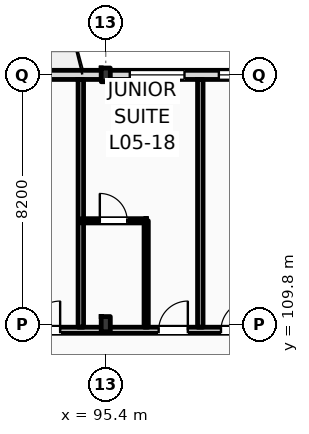
"""IFC4 building model, lengths in metres.
Left out: names, types, materials, properties, quantities, classifications, styles, units other than length and angle.
Written with IfcOpenShell. Run it as: python <this file> out.ifc"""

import sys

from ifc_helpers import new_model, si_unit, direction, frame, frame_2d, origin, origin_2d, place, context, subcontext, project, spatial, rectangle, i_section, extrude, element, fill, save


model = new_model("IFC4")
c1 = context("Model", 3, precision=1e-05, world=origin(), true_north=direction((0.0, 1.0)))
c2 = subcontext(c1, "Body", "Model", "MODEL_VIEW")
j1 = project(units=[si_unit("LENGTHUNIT", "METRE"), si_unit("PLANEANGLEUNIT", "RADIAN")], contexts=[c1])
p1 = place(None, origin())
s1 = spatial("IfcSite", under=j1, at=p1, CompositionType="ELEMENT")
p2 = place(p1, origin())
s2 = spatial("IfcBuilding", under=s1, at=p2, CompositionType="ELEMENT")
p3 = place(p2, frame((0.0, 0.0, 24.6)))
s3 = spatial("IfcBuildingStorey", under=s2, at=p3, CompositionType="ELEMENT", Elevation=24.6)
p4 = place(p3, frame((95.4, 109.8, 0.0), z_axis=(0.0, 0.0, 1.0), x_axis=(1.0, 0.0, 0.0)))
e1 = element("IfcColumn", 1, at=p4, inside=s3, PredefinedType="COLUMN", context=c2, shape_type="SweptSolid", body=[
    extrude(i_section(OverallWidth=0.3, OverallDepth=0.5, WebThickness=0.014, FlangeThickness=0.028, FilletRadius=0.027, at=origin_2d()), origin(), (0.0, 0.0, 1.0), 3.6),
])
p5 = place(p3, frame((95.4, 118.0, 0.0), z_axis=(0.0, 0.0, 1.0), x_axis=(1.0, 0.0, 0.0)))
e2 = element("IfcColumn", 2, at=p5, inside=s3, PredefinedType="COLUMN", context=c2, shape_type="SweptSolid", body=[
    extrude(i_section(OverallWidth=0.3, OverallDepth=0.45, WebThickness=0.014, FlangeThickness=0.026, FilletRadius=0.027, at=origin_2d()), origin(), (0.0, 0.0, 1.0), 3.6),
])
p6 = place(p3, frame((22.5, 118.0, 0.0), z_axis=(0.0, 0.0, 1.0), x_axis=(1.0, 0.0, 0.0)))
e3 = element("IfcWall", 3, at=p6, inside=s3, PredefinedType="STANDARD", context=c2, shape_type="SweptSolid", body=[
    extrude(rectangle(XDim=97.5, YDim=0.3, at=frame_2d((48.75, 0.0))), origin(), (0.0, 0.0, 1.0), 2.78),
])
p7 = place(p6, frame((0.91, 0.0, 0.9)))
e4 = element("IfcOpeningElement", 4, at=p7, cuts=e3, PredefinedType="OPENING", context=c2, shape_type="SweptSolid", body=[
    extrude(rectangle(XDim=0.9, YDim=1.7, at=frame_2d((0.45, 0.85))), frame((0.0, 0.16, 0.0), z_axis=(0.0, -1.0, 0.0), x_axis=(1.0, 0.0, 0.0)), (0.0, 0.0, 1.0), 0.32),
])
p8 = place(p6, frame((6.275, 0.0, 0.0)))
e5 = element("IfcOpeningElement", 5, at=p8, cuts=e3, PredefinedType="OPENING", context=c2, shape_type="SweptSolid", body=[
    extrude(rectangle(XDim=1.2, YDim=2.25, at=frame_2d((0.6, 1.125))), frame((0.0, 0.16, 0.0), z_axis=(0.0, -1.0, 0.0), x_axis=(1.0, 0.0, 0.0)), (0.0, 0.0, 1.0), 0.32),
])
p9 = place(p6, frame((11.42, 0.0, 0.9)))
e6 = element("IfcOpeningElement", 6, at=p9, cuts=e3, PredefinedType="OPENING", context=c2, shape_type="SweptSolid", body=[
    extrude(rectangle(XDim=1.35, YDim=1.7, at=frame_2d((0.675, 0.85))), frame((0.0, 0.16, 0.0), z_axis=(0.0, -1.0, 0.0), x_axis=(1.0, 0.0, 0.0)), (0.0, 0.0, 1.0), 0.32),
])
p10 = place(p6, frame((14.345, 0.0, 0.9)))
e7 = element("IfcOpeningElement", 7, at=p10, cuts=e3, PredefinedType="OPENING", context=c2, shape_type="SweptSolid", body=[
    extrude(rectangle(XDim=1.8, YDim=1.7, at=frame_2d((0.9, 0.85))), frame((0.0, 0.16, 0.0), z_axis=(0.0, -1.0, 0.0), x_axis=(1.0, 0.0, 0.0)), (0.0, 0.0, 1.0), 0.32),
])
p11 = place(p6, frame((19.27, 0.0, 0.9)))
e8 = element("IfcOpeningElement", 8, at=p11, cuts=e3, PredefinedType="OPENING", context=c2, shape_type="SweptSolid", body=[
    extrude(rectangle(XDim=1.95, YDim=1.7, at=frame_2d((0.975, 0.85))), frame((0.0, 0.16, 0.0), z_axis=(0.0, -1.0, 0.0), x_axis=(1.0, 0.0, 0.0)), (0.0, 0.0, 1.0), 0.32),
])
p12 = place(p6, frame((22.97, 0.0, 0.0)))
e9 = element("IfcOpeningElement", 9, at=p12, cuts=e3, PredefinedType="OPENING", context=c2, shape_type="SweptSolid", body=[
    extrude(rectangle(XDim=1.2, YDim=2.25, at=frame_2d((0.6, 1.125))), frame((0.0, 0.16, 0.0), z_axis=(0.0, -1.0, 0.0), x_axis=(1.0, 0.0, 0.0)), (0.0, 0.0, 1.0), 0.32),
])
p13 = place(p6, frame((26.92, 0.0, 0.9)))
e10 = element("IfcOpeningElement", 10, at=p13, cuts=e3, PredefinedType="OPENING", context=c2, shape_type="SweptSolid", body=[
    extrude(rectangle(XDim=2.25, YDim=1.7, at=frame_2d((1.125, 0.85))), frame((0.0, 0.16, 0.0), z_axis=(0.0, -1.0, 0.0), x_axis=(1.0, 0.0, 0.0)), (0.0, 0.0, 1.0), 0.32),
])
p14 = place(p6, frame((30.645, 0.0, 0.9)))
e11 = element("IfcOpeningElement", 11, at=p14, cuts=e3, PredefinedType="OPENING", context=c2, shape_type="SweptSolid", body=[
    extrude(rectangle(XDim=2.4, YDim=1.7, at=frame_2d((1.2, 0.85))), frame((0.0, 0.16, 0.0), z_axis=(0.0, -1.0, 0.0), x_axis=(1.0, 0.0, 0.0)), (0.0, 0.0, 1.0), 0.32),
])
p15 = place(p6, frame((36.71, 0.0, 0.0)))
e12 = element("IfcOpeningElement", 12, at=p15, cuts=e3, PredefinedType="OPENING", context=c2, shape_type="SweptSolid", body=[
    extrude(rectangle(XDim=1.2, YDim=2.25, at=frame_2d((0.6, 1.125))), frame((0.0, 0.16, 0.0), z_axis=(0.0, -1.0, 0.0), x_axis=(1.0, 0.0, 0.0)), (0.0, 0.0, 1.0), 0.32),
])
p16 = place(p6, frame((39.17, 0.0, 0.0)))
e13 = element("IfcOpeningElement", 13, at=p16, cuts=e3, PredefinedType="OPENING", context=c2, shape_type="SweptSolid", body=[
    extrude(rectangle(XDim=1.2, YDim=2.25, at=frame_2d((0.6, 1.125))), frame((0.0, 0.16, 0.0), z_axis=(0.0, -1.0, 0.0), x_axis=(1.0, 0.0, 0.0)), (0.0, 0.0, 1.0), 0.32),
])
p17 = place(p6, frame((43.22, 0.0, 0.9)))
e14 = element("IfcOpeningElement", 14, at=p17, cuts=e3, PredefinedType="OPENING", context=c2, shape_type="SweptSolid", body=[
    extrude(rectangle(XDim=2.85, YDim=1.7, at=frame_2d((1.425, 0.85))), frame((0.0, 0.16, 0.0), z_axis=(0.0, -1.0, 0.0), x_axis=(1.0, 0.0, 0.0)), (0.0, 0.0, 1.0), 0.32),
])
p18 = place(p6, frame((47.29, 0.0, 0.9)))
e15 = element("IfcOpeningElement", 15, at=p18, cuts=e3, PredefinedType="OPENING", context=c2, shape_type="SweptSolid", body=[
    extrude(rectangle(XDim=1.35, YDim=1.7, at=frame_2d((0.675, 0.85))), frame((0.0, 0.16, 0.0), z_axis=(0.0, -1.0, 0.0), x_axis=(1.0, 0.0, 0.0)), (0.0, 0.0, 1.0), 0.32),
])
p19 = place(p6, frame((52.91, 0.0, 0.0)))
e16 = element("IfcOpeningElement", 16, at=p19, cuts=e3, PredefinedType="OPENING", context=c2, shape_type="SweptSolid", body=[
    extrude(rectangle(XDim=1.2, YDim=2.25, at=frame_2d((0.6, 1.125))), frame((0.0, 0.16, 0.0), z_axis=(0.0, -1.0, 0.0), x_axis=(1.0, 0.0, 0.0)), (0.0, 0.0, 1.0), 0.32),
])
p20 = place(p6, frame((55.69, 0.0, 0.9)))
e17 = element("IfcOpeningElement", 17, at=p20, cuts=e3, PredefinedType="OPENING", context=c2, shape_type="SweptSolid", body=[
    extrude(rectangle(XDim=0.9, YDim=1.7, at=frame_2d((0.45, 0.85))), frame((0.0, 0.16, 0.0), z_axis=(0.0, -1.0, 0.0), x_axis=(1.0, 0.0, 0.0)), (0.0, 0.0, 1.0), 0.32),
])
p21 = place(p6, frame((59.82, 0.0, 0.9)))
e18 = element("IfcOpeningElement", 18, at=p21, cuts=e3, PredefinedType="OPENING", context=c2, shape_type="SweptSolid", body=[
    extrude(rectangle(XDim=3.25, YDim=1.7, at=frame_2d((1.625, 0.85))), frame((0.0, 0.16, 0.0), z_axis=(0.0, -1.0, 0.0), x_axis=(1.0, 0.0, 0.0)), (0.0, 0.0, 1.0), 0.32),
])
p22 = place(p6, frame((65.89, 0.0, 0.9)))
e19 = element("IfcOpeningElement", 19, at=p22, cuts=e3, PredefinedType="OPENING", context=c2, shape_type="SweptSolid", body=[
    extrude(rectangle(XDim=1.1, YDim=1.7, at=frame_2d((0.55, 0.85))), frame((0.0, 0.16, 0.0), z_axis=(0.0, -1.0, 0.0), x_axis=(1.0, 0.0, 0.0)), (0.0, 0.0, 1.0), 0.32),
])
p23 = place(p6, frame((69.245, 0.0, 0.0)))
e20 = element("IfcOpeningElement", 20, at=p23, cuts=e3, PredefinedType="OPENING", context=c2, shape_type="SweptSolid", body=[
    extrude(rectangle(XDim=1.2, YDim=2.25, at=frame_2d((0.6, 1.125))), frame((0.0, 0.16, 0.0), z_axis=(0.0, -1.0, 0.0), x_axis=(1.0, 0.0, 0.0)), (0.0, 0.0, 1.0), 0.32),
])
p24 = place(p6, frame((73.69, 0.0, 0.9)))
e21 = element("IfcOpeningElement", 21, at=p24, cuts=e3, PredefinedType="OPENING", context=c2, shape_type="SweptSolid", body=[
    extrude(rectangle(XDim=1.8, YDim=1.7, at=frame_2d((0.9, 0.85))), frame((0.0, 0.16, 0.0), z_axis=(0.0, -1.0, 0.0), x_axis=(1.0, 0.0, 0.0)), (0.0, 0.0, 1.0), 0.32),
])
p25 = place(p6, frame((76.62, 0.0, 0.9)))
e22 = element("IfcOpeningElement", 22, at=p25, cuts=e3, PredefinedType="OPENING", context=c2, shape_type="SweptSolid", body=[
    extrude(rectangle(XDim=3.25, YDim=1.7, at=frame_2d((1.625, 0.85))), frame((0.0, 0.16, 0.0), z_axis=(0.0, -1.0, 0.0), x_axis=(1.0, 0.0, 0.0)), (0.0, 0.0, 1.0), 0.32),
])
p26 = place(p6, frame((81.895, 0.0, 0.9)))
e23 = element("IfcOpeningElement", 23, at=p26, cuts=e3, PredefinedType="OPENING", context=c2, shape_type="SweptSolid", body=[
    extrude(rectangle(XDim=1.1, YDim=1.5, at=frame_2d((0.55, 0.75))), frame((0.0, 0.16, 0.0), z_axis=(0.0, -1.0, 0.0), x_axis=(1.0, 0.0, 0.0)), (0.0, 0.0, 1.0), 0.32),
])
p27 = place(p6, frame((86.02, 0.0, 0.9)))
e24 = element("IfcOpeningElement", 24, at=p27, cuts=e3, PredefinedType="OPENING", context=c2, shape_type="SweptSolid", body=[
    extrude(rectangle(XDim=1.25, YDim=1.6, at=frame_2d((0.625, 0.8))), frame((0.0, 0.16, 0.0), z_axis=(0.0, -1.0, 0.0), x_axis=(1.0, 0.0, 0.0)), (0.0, 0.0, 1.0), 0.32),
])
p28 = place(p6, frame((90.145, 0.0, 0.9)))
e25 = element("IfcOpeningElement", 25, at=p28, cuts=e3, PredefinedType="OPENING", context=c2, shape_type="SweptSolid", body=[
    extrude(rectangle(XDim=1.4, YDim=1.7, at=frame_2d((0.7, 0.85))), frame((0.0, 0.16, 0.0), z_axis=(0.0, -1.0, 0.0), x_axis=(1.0, 0.0, 0.0)), (0.0, 0.0, 1.0), 0.32),
])
p29 = place(p6, frame((94.155, 0.0, 0.9)))
e26 = element("IfcOpeningElement", 26, at=p29, cuts=e3, PredefinedType="OPENING", context=c2, shape_type="SweptSolid", body=[
    extrude(rectangle(XDim=1.6, YDim=1.7, at=frame_2d((0.8, 0.85))), frame((0.0, 0.16, 0.0), z_axis=(0.0, -1.0, 0.0), x_axis=(1.0, 0.0, 0.0)), (0.0, 0.0, 1.0), 0.32),
])
p30 = place(p3, frame((10.65, 109.6, 0.0), z_axis=(0.0, 0.0, 1.0), x_axis=(1.0, 0.0, 0.0)))
e27 = element("IfcWall", 27, at=p30, inside=s3, PredefinedType="PARTITIONING", context=c2, shape_type="SweptSolid", body=[
    extrude(rectangle(XDim=109.21, YDim=0.2, at=frame_2d((54.605, 0.0))), origin(), (0.0, 0.0, 1.0), 2.78),
])
p31 = place(p30, frame((12.705, 0.0, 0.0)))
e28 = element("IfcOpeningElement", 28, at=p31, cuts=e27, PredefinedType="OPENING", context=c2, shape_type="SweptSolid", body=[
    extrude(rectangle(XDim=1.02, YDim=2.2, at=frame_2d((0.51, 1.1))), frame((0.0, 0.11, 0.0), z_axis=(0.0, -1.0, 0.0), x_axis=(1.0, 0.0, 0.0)), (0.0, 0.0, 1.0), 0.22),
])
p32 = place(p30, frame((19.26, 0.0, 0.0)))
e29 = element("IfcOpeningElement", 29, at=p32, cuts=e27, PredefinedType="OPENING", context=c2, shape_type="SweptSolid", body=[
    extrude(rectangle(XDim=1.02, YDim=2.2, at=frame_2d((0.51, 1.1))), frame((0.0, 0.11, 0.0), z_axis=(0.0, -1.0, 0.0), x_axis=(1.0, 0.0, 0.0)), (0.0, 0.0, 1.0), 0.22),
])
p33 = place(p30, frame((23.71, 0.0, 0.0)))
e30 = element("IfcOpeningElement", 30, at=p33, cuts=e27, PredefinedType="OPENING", context=c2, shape_type="SweptSolid", body=[
    extrude(rectangle(XDim=1.02, YDim=2.2, at=frame_2d((0.51, 1.1))), frame((0.0, 0.11, 0.0), z_axis=(0.0, -1.0, 0.0), x_axis=(1.0, 0.0, 0.0)), (0.0, 0.0, 1.0), 0.22),
])
p34 = place(p30, frame((27.66, 0.0, 0.0)))
e31 = element("IfcOpeningElement", 31, at=p34, cuts=e27, PredefinedType="OPENING", context=c2, shape_type="SweptSolid", body=[
    extrude(rectangle(XDim=1.02, YDim=2.2, at=frame_2d((0.51, 1.1))), frame((0.0, 0.11, 0.0), z_axis=(0.0, -1.0, 0.0), x_axis=(1.0, 0.0, 0.0)), (0.0, 0.0, 1.0), 0.22),
])
p35 = place(p30, frame((31.89, 0.0, 0.0)))
e32 = element("IfcOpeningElement", 32, at=p35, cuts=e27, PredefinedType="OPENING", context=c2, shape_type="SweptSolid", body=[
    extrude(rectangle(XDim=0.96, YDim=2.2, at=frame_2d((0.48, 1.1))), frame((0.0, 0.11, 0.0), z_axis=(0.0, -1.0, 0.0), x_axis=(1.0, 0.0, 0.0)), (0.0, 0.0, 1.0), 0.22),
])
p36 = place(p30, frame((33.94, 0.0, 0.0)))
e33 = element("IfcOpeningElement", 33, at=p36, cuts=e27, PredefinedType="OPENING", context=c2, shape_type="SweptSolid", body=[
    extrude(rectangle(XDim=0.96, YDim=2.2, at=frame_2d((0.48, 1.1))), frame((0.0, 0.11, 0.0), z_axis=(0.0, -1.0, 0.0), x_axis=(1.0, 0.0, 0.0)), (0.0, 0.0, 1.0), 0.22),
])
p37 = place(p30, frame((40.29, 0.0, 0.0)))
e34 = element("IfcOpeningElement", 34, at=p37, cuts=e27, PredefinedType="OPENING", context=c2, shape_type="SweptSolid", body=[
    extrude(rectangle(XDim=0.96, YDim=2.2, at=frame_2d((0.48, 1.1))), frame((0.0, 0.11, 0.0), z_axis=(0.0, -1.0, 0.0), x_axis=(1.0, 0.0, 0.0)), (0.0, 0.0, 1.0), 0.22),
])
p38 = place(p30, frame((42.34, 0.0, 0.0)))
e35 = element("IfcOpeningElement", 35, at=p38, cuts=e27, PredefinedType="OPENING", context=c2, shape_type="SweptSolid", body=[
    extrude(rectangle(XDim=0.96, YDim=2.2, at=frame_2d((0.48, 1.1))), frame((0.0, 0.11, 0.0), z_axis=(0.0, -1.0, 0.0), x_axis=(1.0, 0.0, 0.0)), (0.0, 0.0, 1.0), 0.22),
])
p39 = place(p30, frame((48.69, 0.0, 0.0)))
e36 = element("IfcOpeningElement", 36, at=p39, cuts=e27, PredefinedType="OPENING", context=c2, shape_type="SweptSolid", body=[
    extrude(rectangle(XDim=0.96, YDim=2.2, at=frame_2d((0.48, 1.1))), frame((0.0, 0.11, 0.0), z_axis=(0.0, -1.0, 0.0), x_axis=(1.0, 0.0, 0.0)), (0.0, 0.0, 1.0), 0.22),
])
p40 = place(p30, frame((50.74, 0.0, 0.0)))
e37 = element("IfcOpeningElement", 37, at=p40, cuts=e27, PredefinedType="OPENING", context=c2, shape_type="SweptSolid", body=[
    extrude(rectangle(XDim=0.96, YDim=2.2, at=frame_2d((0.48, 1.1))), frame((0.0, 0.11, 0.0), z_axis=(0.0, -1.0, 0.0), x_axis=(1.0, 0.0, 0.0)), (0.0, 0.0, 1.0), 0.22),
])
p41 = place(p30, frame((57.09, 0.0, 0.0)))
e38 = element("IfcOpeningElement", 38, at=p41, cuts=e27, PredefinedType="OPENING", context=c2, shape_type="SweptSolid", body=[
    extrude(rectangle(XDim=0.96, YDim=2.2, at=frame_2d((0.48, 1.1))), frame((0.0, 0.11, 0.0), z_axis=(0.0, -1.0, 0.0), x_axis=(1.0, 0.0, 0.0)), (0.0, 0.0, 1.0), 0.22),
])
p42 = place(p30, frame((59.14, 0.0, 0.0)))
e39 = element("IfcOpeningElement", 39, at=p42, cuts=e27, PredefinedType="OPENING", context=c2, shape_type="SweptSolid", body=[
    extrude(rectangle(XDim=0.96, YDim=2.2, at=frame_2d((0.48, 1.1))), frame((0.0, 0.11, 0.0), z_axis=(0.0, -1.0, 0.0), x_axis=(1.0, 0.0, 0.0)), (0.0, 0.0, 1.0), 0.22),
])
p43 = place(p30, frame((65.49, 0.0, 0.0)))
e40 = element("IfcOpeningElement", 40, at=p43, cuts=e27, PredefinedType="OPENING", context=c2, shape_type="SweptSolid", body=[
    extrude(rectangle(XDim=0.96, YDim=2.2, at=frame_2d((0.48, 1.1))), frame((0.0, 0.11, 0.0), z_axis=(0.0, -1.0, 0.0), x_axis=(1.0, 0.0, 0.0)), (0.0, 0.0, 1.0), 0.22),
])
p44 = place(p30, frame((67.54, 0.0, 0.0)))
e41 = element("IfcOpeningElement", 41, at=p44, cuts=e27, PredefinedType="OPENING", context=c2, shape_type="SweptSolid", body=[
    extrude(rectangle(XDim=0.96, YDim=2.2, at=frame_2d((0.48, 1.1))), frame((0.0, 0.11, 0.0), z_axis=(0.0, -1.0, 0.0), x_axis=(1.0, 0.0, 0.0)), (0.0, 0.0, 1.0), 0.22),
])
p45 = place(p30, frame((73.89, 0.0, 0.0)))
e42 = element("IfcOpeningElement", 42, at=p45, cuts=e27, PredefinedType="OPENING", context=c2, shape_type="SweptSolid", body=[
    extrude(rectangle(XDim=0.96, YDim=2.2, at=frame_2d((0.48, 1.1))), frame((0.0, 0.11, 0.0), z_axis=(0.0, -1.0, 0.0), x_axis=(1.0, 0.0, 0.0)), (0.0, 0.0, 1.0), 0.22),
])
p46 = place(p30, frame((78.09, 0.0, 0.0)))
e43 = element("IfcOpeningElement", 43, at=p46, cuts=e27, PredefinedType="OPENING", context=c2, shape_type="SweptSolid", body=[
    extrude(rectangle(XDim=0.96, YDim=2.2, at=frame_2d((0.48, 1.1))), frame((0.0, 0.11, 0.0), z_axis=(0.0, -1.0, 0.0), x_axis=(1.0, 0.0, 0.0)), (0.0, 0.0, 1.0), 0.22),
])
p47 = place(p30, frame((82.29, 0.0, 0.0)))
e44 = element("IfcOpeningElement", 44, at=p47, cuts=e27, PredefinedType="OPENING", context=c2, shape_type="SweptSolid", body=[
    extrude(rectangle(XDim=0.96, YDim=2.2, at=frame_2d((0.48, 1.1))), frame((0.0, 0.11, 0.0), z_axis=(0.0, -1.0, 0.0), x_axis=(1.0, 0.0, 0.0)), (0.0, 0.0, 1.0), 0.22),
])
p48 = place(p30, frame((86.49, 0.0, 0.0)))
e45 = element("IfcOpeningElement", 45, at=p48, cuts=e27, PredefinedType="OPENING", context=c2, shape_type="SweptSolid", body=[
    extrude(rectangle(XDim=0.96, YDim=2.2, at=frame_2d((0.48, 1.1))), frame((0.0, 0.11, 0.0), z_axis=(0.0, -1.0, 0.0), x_axis=(1.0, 0.0, 0.0)), (0.0, 0.0, 1.0), 0.22),
])
p49 = place(p30, frame((88.54, 0.0, 0.0)))
e46 = element("IfcOpeningElement", 46, at=p49, cuts=e27, PredefinedType="OPENING", context=c2, shape_type="SweptSolid", body=[
    extrude(rectangle(XDim=0.96, YDim=2.2, at=frame_2d((0.48, 1.1))), frame((0.0, 0.11, 0.0), z_axis=(0.0, -1.0, 0.0), x_axis=(1.0, 0.0, 0.0)), (0.0, 0.0, 1.0), 0.22),
])
p50 = place(p30, frame((94.89, 0.0, 0.0)))
e47 = element("IfcOpeningElement", 47, at=p50, cuts=e27, PredefinedType="OPENING", context=c2, shape_type="SweptSolid", body=[
    extrude(rectangle(XDim=0.96, YDim=2.2, at=frame_2d((0.48, 1.1))), frame((0.0, 0.11, 0.0), z_axis=(0.0, -1.0, 0.0), x_axis=(1.0, 0.0, 0.0)), (0.0, 0.0, 1.0), 0.22),
])
p51 = place(p30, frame((96.94, 0.0, 0.0)))
e48 = element("IfcOpeningElement", 48, at=p51, cuts=e27, PredefinedType="OPENING", context=c2, shape_type="SweptSolid", body=[
    extrude(rectangle(XDim=0.96, YDim=2.2, at=frame_2d((0.48, 1.1))), frame((0.0, 0.11, 0.0), z_axis=(0.0, -1.0, 0.0), x_axis=(1.0, 0.0, 0.0)), (0.0, 0.0, 1.0), 0.22),
])
p52 = place(p30, frame((103.29, 0.0, 0.0)))
e49 = element("IfcOpeningElement", 49, at=p52, cuts=e27, PredefinedType="OPENING", context=c2, shape_type="SweptSolid", body=[
    extrude(rectangle(XDim=0.96, YDim=2.2, at=frame_2d((0.48, 1.1))), frame((0.0, 0.11, 0.0), z_axis=(0.0, -1.0, 0.0), x_axis=(1.0, 0.0, 0.0)), (0.0, 0.0, 1.0), 0.22),
])
p53 = place(p30, frame((105.25, 0.0, 0.0)))
e50 = element("IfcOpeningElement", 50, at=p53, cuts=e27, PredefinedType="OPENING", context=c2, shape_type="SweptSolid", body=[
    extrude(rectangle(XDim=0.96, YDim=2.2, at=frame_2d((0.48, 1.1))), frame((0.0, 0.11, 0.0), z_axis=(0.0, -1.0, 0.0), x_axis=(1.0, 0.0, 0.0)), (0.0, 0.0, 1.0), 0.22),
])
p54 = place(p30, frame((2.716, 0.0, 0.0)))
e51 = element("IfcOpeningElement", 51, at=p54, cuts=e27, PredefinedType="OPENING", context=c2, shape_type="SweptSolid", body=[
    extrude(rectangle(XDim=1.35, YDim=2.25, at=frame_2d((0.675, 1.125))), frame((0.0, 0.11, 0.0), z_axis=(0.0, -1.0, 0.0), x_axis=(1.0, 0.0, 0.0)), (0.0, 0.0, 1.0), 0.22),
])
p55 = place(p30, frame((6.65, 0.0, 0.0)))
e52 = element("IfcOpeningElement", 52, at=p55, cuts=e27, PredefinedType="OPENING", context=c2, shape_type="SweptSolid", body=[
    extrude(rectangle(XDim=1.35, YDim=2.25, at=frame_2d((0.675, 1.125))), frame((0.0, 0.11, 0.0), z_axis=(0.0, -1.0, 0.0), x_axis=(1.0, 0.0, 0.0)), (0.0, 0.0, 1.0), 0.22),
])
p56 = place(p30, frame((10.583, 0.0, 0.0)))
e53 = element("IfcOpeningElement", 53, at=p56, cuts=e27, PredefinedType="OPENING", context=c2, shape_type="SweptSolid", body=[
    extrude(rectangle(XDim=1.35, YDim=2.25, at=frame_2d((0.675, 1.125))), frame((0.0, 0.11, 0.0), z_axis=(0.0, -1.0, 0.0), x_axis=(1.0, 0.0, 0.0)), (0.0, 0.0, 1.0), 0.22),
])
for number, where, z_axis, x_axis in (
    (54, (94.58, 109.7, 0.0), (0.0, 0.0, 1.0), (0.0, 1.0, 0.0)),
    (55, (98.51, 109.7, 0.0), (0.0, 0.0, 1.0), (0.0, 1.0, 0.0)),
):
    element("IfcWall", number, at=place(p3, frame(where, z_axis=z_axis, x_axis=x_axis)), inside=s3, PredefinedType="PARTITIONING", context=c2, shape_type="SweptSolid", body=[
        extrude(rectangle(XDim=8.15, YDim=0.18, at=frame_2d((4.075, 0.0))), origin(), (0.0, 0.0, 1.0), 3.34),
    ])
p57 = place(p3, frame((96.73, 109.7, 0.0), z_axis=(0.0, 0.0, 1.0), x_axis=(0.0, 1.0, 0.0)))
e56 = element("IfcWall", 56, at=p57, inside=s3, PredefinedType="PARTITIONING", context=c2, shape_type="SweptSolid", body=[
    extrude(rectangle(XDim=3.5, YDim=0.14, at=frame_2d((1.75, 0.0))), origin(), (0.0, 0.0, 1.0), 3.34),
])
p58 = place(p3, frame((94.58, 113.2, 0.0), z_axis=(0.0, 0.0, 1.0), x_axis=(1.0, 0.0, 0.0)))
e57 = element("IfcWall", 57, at=p58, inside=s3, PredefinedType="PARTITIONING", context=c2, shape_type="SweptSolid", body=[
    extrude(rectangle(XDim=2.15, YDim=0.14, at=frame_2d((1.075, 0.0))), origin(), (0.0, 0.0, 1.0), 3.34),
])
p59 = place(p58, frame((0.625, 0.0, 0.0)))
e58 = element("IfcOpeningElement", 58, at=p59, cuts=e57, PredefinedType="OPENING", context=c2, shape_type="SweptSolid", body=[
    extrude(rectangle(XDim=0.9, YDim=2.1, at=frame_2d((0.45, 1.05))), frame((0.0, 0.08, 0.0), z_axis=(0.0, -1.0, 0.0), x_axis=(1.0, 0.0, 0.0)), (0.0, 0.0, 1.0), 0.16),
])
p60 = place(p24, origin())
e59 = element("IfcWindow", 59, at=p60, inside=s3, PartitioningType="DOUBLE_PANEL_VERTICAL", PredefinedType="WINDOW", context=c2, shape_type="SweptSolid", body=[
    extrude(rectangle(XDim=1.8, YDim=1.7, at=frame_2d((0.9, 0.85))), frame((0.0, 0.03, 0.0), z_axis=(0.0, -1.0, 0.0), x_axis=(1.0, 0.0, 0.0)), (0.0, 0.0, 1.0), 0.06),
])
fill(e21, e59)
p61 = place(p25, origin())
e60 = element("IfcWindow", 60, at=p61, inside=s3, PartitioningType="DOUBLE_PANEL_VERTICAL", PredefinedType="WINDOW", context=c2, shape_type="SweptSolid", body=[
    extrude(rectangle(XDim=3.25, YDim=1.7, at=frame_2d((1.625, 0.85))), frame((0.0, 0.03, 0.0), z_axis=(0.0, -1.0, 0.0), x_axis=(1.0, 0.0, 0.0)), (0.0, 0.0, 1.0), 0.06),
])
fill(e22, e60)
p62 = place(p47, origin())
e61 = element("IfcDoor", 61, at=p62, inside=s3, OperationType="SINGLE_SWING_RIGHT", PredefinedType="DOOR", context=c2, shape_type="SweptSolid", body=[
    extrude(rectangle(XDim=0.96, YDim=2.2, at=frame_2d((0.48, 1.1))), frame((0.0, 0.025, 0.0), z_axis=(0.0, -1.0, 0.0), x_axis=(1.0, 0.0, 0.0)), (0.0, 0.0, 1.0), 0.05),
])
fill(e44, e61)
p63 = place(p48, origin())
e62 = element("IfcDoor", 62, at=p63, inside=s3, OperationType="SINGLE_SWING_RIGHT", PredefinedType="DOOR", context=c2, shape_type="SweptSolid", body=[
    extrude(rectangle(XDim=0.96, YDim=2.2, at=frame_2d((0.48, 1.1))), frame((0.0, 0.025, 0.0), z_axis=(0.0, -1.0, 0.0), x_axis=(1.0, 0.0, 0.0)), (0.0, 0.0, 1.0), 0.05),
])
fill(e45, e62)
p64 = place(p59, origin())
e63 = element("IfcDoor", 63, at=p64, inside=s3, OperationType="SINGLE_SWING_LEFT", PredefinedType="DOOR", context=c2, shape_type="SweptSolid", body=[
    extrude(rectangle(XDim=0.9, YDim=2.1, at=frame_2d((0.45, 1.05))), frame((0.0, 0.025, 0.0), z_axis=(0.0, -1.0, 0.0), x_axis=(1.0, 0.0, 0.0)), (0.0, 0.0, 1.0), 0.05),
])
fill(e58, e63)
p65 = place(p49, origin())
e64 = element("IfcDoor", 64, at=p65, inside=s3, OperationType="SINGLE_SWING_RIGHT", PredefinedType="DOOR", context=c2, shape_type="SweptSolid", body=[
    extrude(rectangle(XDim=0.96, YDim=2.2, at=frame_2d((0.48, 1.1))), frame((0.0, 0.025, 0.0), z_axis=(0.0, -1.0, 0.0), x_axis=(1.0, 0.0, 0.0)), (0.0, 0.0, 1.0), 0.05),
])
fill(e46, e64)
save(model, sys.argv[1])
